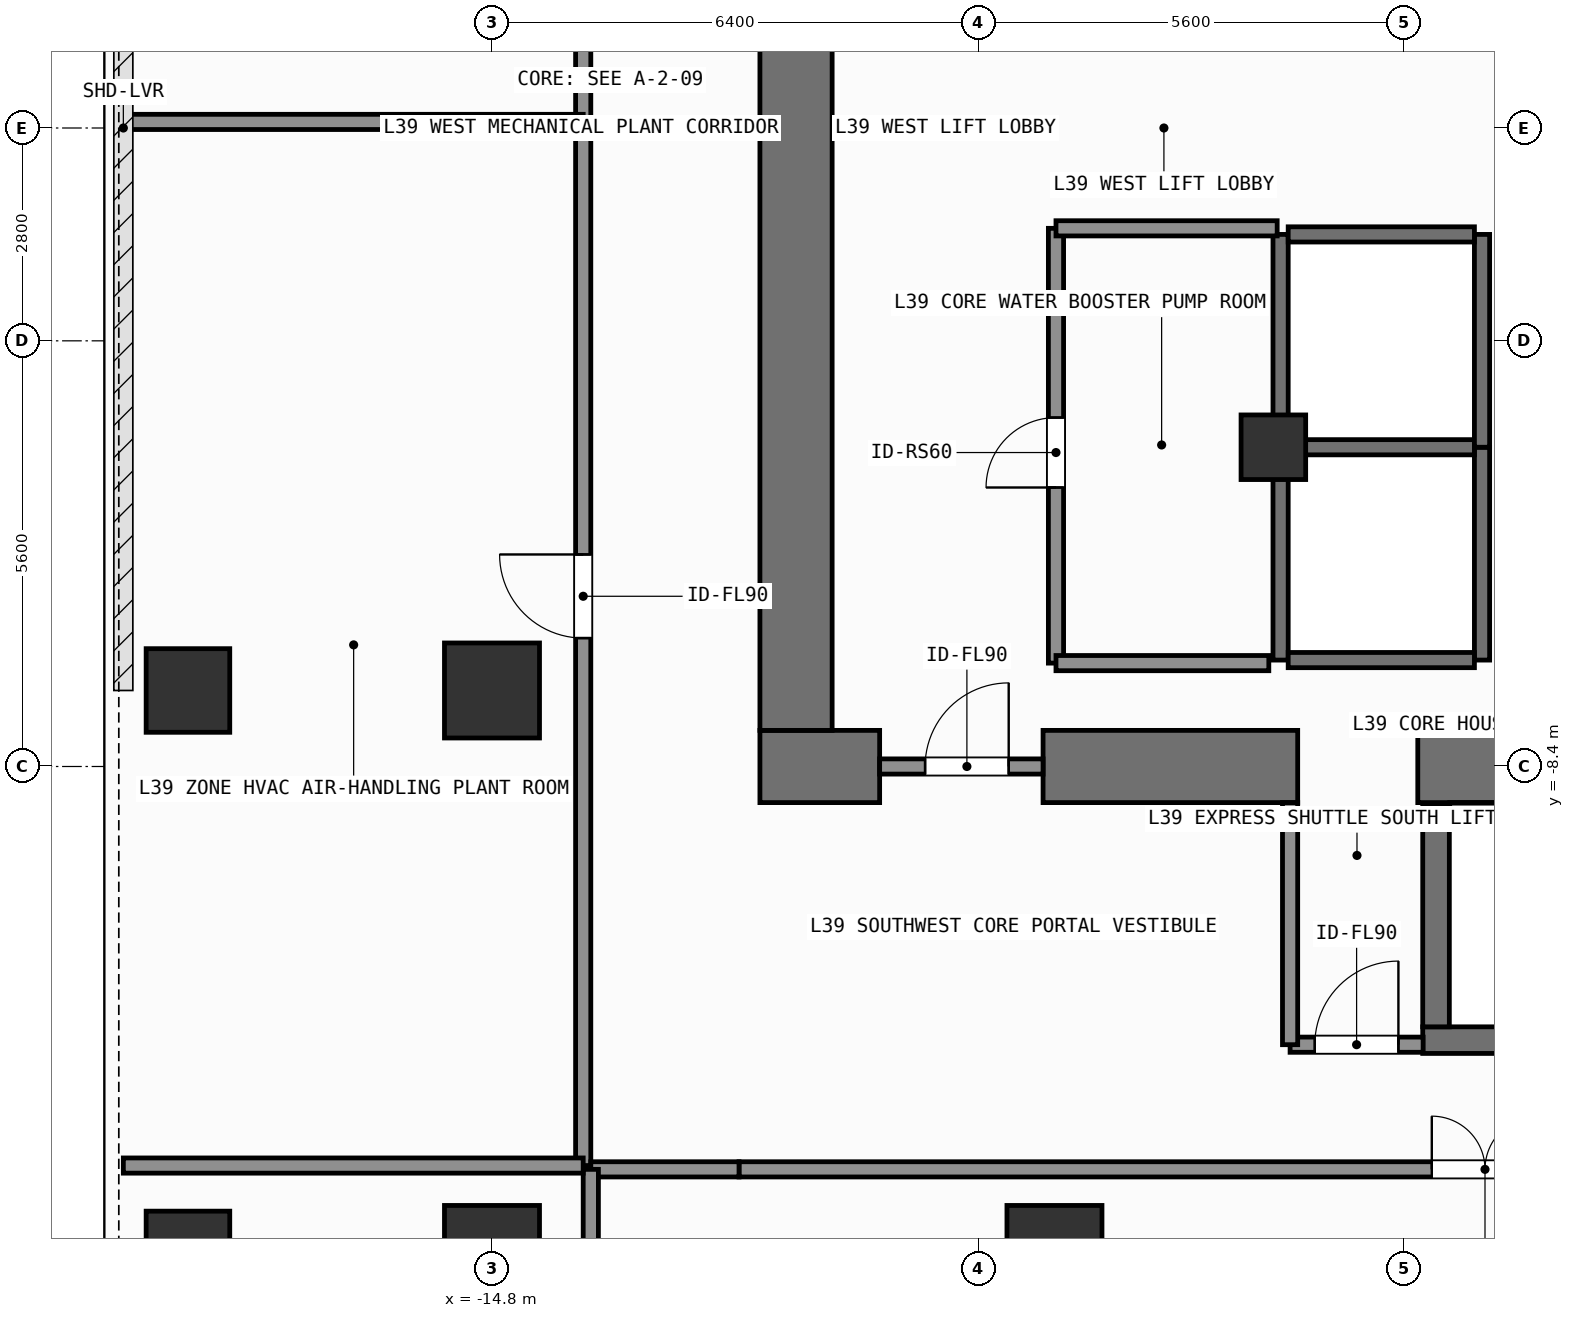
"""IFC4 building model, lengths in metres.
Left out: names, types, materials, properties, quantities, classifications, styles, units other than length and angle.
Written with IfcOpenShell. Run it as: python <this file> out.ifc"""

import sys

from ifc_helpers import new_model, si_unit, direction, frame, frame_2d, origin, origin_2d, place, context, subcontext, project, spatial, rectangle, extrude, element, fill, save


model = new_model("IFC4")
c1 = context("Model", 3, precision=1e-05, world=origin(), true_north=direction((0.0, 1.0)))
c2 = subcontext(c1, "Body", "Model", "MODEL_VIEW")
j1 = project(units=[si_unit("LENGTHUNIT", "METRE"), si_unit("PLANEANGLEUNIT", "RADIAN")], contexts=[c1])
p1 = place(None, origin())
s1 = spatial("IfcSite", under=j1, at=p1, CompositionType="ELEMENT")
p2 = place(p1, origin())
s2 = spatial("IfcBuilding", under=s1, at=p2, CompositionType="ELEMENT")
p3 = place(p2, frame((0.0, 0.0, 156.3)))
s3 = spatial("IfcBuildingStorey", under=s2, at=p3, CompositionType="ELEMENT", Elevation=156.3)
p4 = place(p3, frame((-11.275, -8.4, 0.0), z_axis=(0.0, 0.0, 1.0), x_axis=(1.0, 0.0, 0.0)))
e1 = element("IfcWall", 1, at=p4, inside=s3, PredefinedType="SHEAR", context=c2, shape_type="SweptSolid", body=[
    extrude(rectangle(XDim=1.575, YDim=0.95, at=frame_2d((0.788, 0.0))), origin(), (0.0, 0.0, 1.0), 7.8),
])
p5 = place(p3, frame((-7.55, -8.4, 0.0), z_axis=(0.0, 0.0, 1.0), x_axis=(1.0, 0.0, 0.0)))
e2 = element("IfcWall", 2, at=p5, inside=s3, PredefinedType="SHEAR", context=c2, shape_type="SweptSolid", body=[
    extrude(rectangle(XDim=3.35, YDim=0.95, at=frame_2d((1.675, 0.0))), origin(), (0.0, 0.0, 1.0), 7.8),
])
p6 = place(p3, frame((-2.62, -8.4, 0.0), z_axis=(0.0, 0.0, 1.0), x_axis=(1.0, 0.0, 0.0)))
e3 = element("IfcWall", 3, at=p6, inside=s3, PredefinedType="SHEAR", context=c2, shape_type="SweptSolid", body=[
    extrude(rectangle(XDim=7.27, YDim=0.95, at=frame_2d((3.635, 0.0))), origin(), (0.0, 0.0, 1.0), 7.8),
])
p7 = place(p3, frame((-10.8, -7.925, 0.0), z_axis=(0.0, 0.0, 1.0), x_axis=(0.0, 1.0, 0.0)))
e4 = element("IfcWall", 4, at=p7, inside=s3, PredefinedType="SHEAR", context=c2, shape_type="SweptSolid", body=[
    extrude(rectangle(XDim=15.85, YDim=0.95, at=frame_2d((7.925, 0.0))), origin(), (0.0, 0.0, 1.0), 7.8),
])
p8 = place(p3, frame((-2.555, -12.0, 0.0), z_axis=(0.0, 0.0, 1.0), x_axis=(1.0, 0.0, 0.0)))
e5 = element("IfcWall", 5, at=p8, inside=s3, PredefinedType="SHEAR", context=c2, shape_type="SweptSolid", body=[
    extrude(rectangle(XDim=7.31, YDim=0.35, at=frame_2d((3.655, 0.0))), origin(), (0.0, 0.0, 1.0), 7.8),
])
p9 = place(p3, frame((-2.2, -8.95, 0.0), z_axis=(0.0, 0.0, 1.0), x_axis=(1.0, 0.0, 0.0)))
e6 = element("IfcWall", 6, at=p9, inside=s3, PredefinedType="SHEAR", context=c2, shape_type="SweptSolid", body=[
    extrude(rectangle(XDim=6.6, YDim=0.15, at=frame_2d((3.3, 0.0))), origin(), (0.0, 0.0, 1.0), 7.8),
])
p10 = place(p3, frame((-2.38, -11.825, 0.0), z_axis=(0.0, 0.0, 1.0), x_axis=(0.0, 1.0, 0.0)))
e7 = element("IfcWall", 7, at=p10, inside=s3, PredefinedType="SHEAR", context=c2, shape_type="SweptSolid", body=[
    extrude(rectangle(XDim=2.925, YDim=0.35, at=frame_2d((1.462, 0.0))), origin(), (0.0, 0.0, 1.0), 7.8),
])
for number, where, z_axis, x_axis in (
    (8, (-14.8, -14.8, 0.0), (0.0, 0.0, 1.0), (1.0, 0.0, 0.0)),
    (9, (-7.4, -14.8, 0.0), (0.0, 0.0, 1.0), (1.0, 0.0, 0.0)),
    (10, (-14.8, -7.4, 0.0), (0.0, 0.0, 1.0), (1.0, 0.0, 0.0)),
):
    element("IfcColumn", number, at=place(p3, frame(where, z_axis=z_axis, x_axis=x_axis)), inside=s3, PredefinedType="COLUMN", context=c2, shape_type="SweptSolid", body=[
        extrude(rectangle(XDim=1.25, YDim=1.25, at=origin_2d()), origin(), (0.0, 0.0, 1.0), 7.8),
    ])
p11 = place(p3, frame((-4.52, -4.2, 0.0), z_axis=(0.0, 0.0, 1.0), x_axis=(1.0, 0.0, 0.0)))
e11 = element("IfcColumn", 11, at=p11, inside=s3, PredefinedType="COLUMN", context=c2, shape_type="SweptSolid", body=[
    extrude(rectangle(XDim=0.85, YDim=0.85, at=origin_2d()), origin(), (0.0, 0.0, 1.0), 7.8),
])
for number, where, z_axis, x_axis in (
    (12, (-18.8, -14.8, 0.0), (0.0, 0.0, 1.0), (1.0, 0.0, 0.0)),
    (13, (-18.8, -7.4, 0.0), (0.0, 0.0, 1.0), (1.0, 0.0, 0.0)),
):
    element("IfcColumn", number, at=place(p3, frame(where, z_axis=z_axis, x_axis=x_axis)), inside=s3, PredefinedType="COLUMN", context=c2, shape_type="SweptSolid", body=[
        extrude(rectangle(XDim=1.1, YDim=1.1, at=origin_2d()), origin(), (0.0, 0.0, 1.0), 7.8),
    ])
for number, where, z_axis, x_axis in (
    (14, (-4.425, -7.0, 0.0), (0.0, 0.0, 1.0), (0.0, 1.0, 0.0)),
    (15, (-1.775, -7.0, 0.0), (0.0, 0.0, 1.0), (0.0, 1.0, 0.0)),
):
    element("IfcWall", number, at=place(p3, frame(where, z_axis=z_axis, x_axis=x_axis)), inside=s3, PredefinedType="SHEAR", context=c2, shape_type="SweptSolid", body=[
        extrude(rectangle(XDim=2.8, YDim=0.2, at=frame_2d((1.4, 0.0))), origin(), (0.0, 0.0, 1.0), 7.58),
    ])
for number, where, z_axis, x_axis in (
    (16, (-4.325, -7.0, 0.0), (0.0, 0.0, 1.0), (1.0, 0.0, 0.0)),
    (17, (-4.325, -4.2, 0.0), (0.0, 0.0, 1.0), (1.0, 0.0, 0.0)),
):
    element("IfcWall", number, at=place(p3, frame(where, z_axis=z_axis, x_axis=x_axis)), inside=s3, PredefinedType="SHEAR", context=c2, shape_type="SweptSolid", body=[
        extrude(rectangle(XDim=2.45, YDim=0.2, at=frame_2d((1.225, 0.0))), origin(), (0.0, 0.0, 1.0), 7.58),
    ])
for number, where, z_axis, x_axis in (
    (18, (-4.425, -4.2, 0.0), (0.0, 0.0, 1.0), (0.0, 1.0, 0.0)),
    (19, (-1.775, -4.2, 0.0), (0.0, 0.0, 1.0), (0.0, 1.0, 0.0)),
):
    element("IfcWall", number, at=place(p3, frame(where, z_axis=z_axis, x_axis=x_axis)), inside=s3, PredefinedType="SHEAR", context=c2, shape_type="SweptSolid", body=[
        extrude(rectangle(XDim=2.8, YDim=0.2, at=frame_2d((1.4, 0.0))), origin(), (0.0, 0.0, 1.0), 7.58),
    ])
p12 = place(p3, frame((-4.325, -1.4, 0.0), z_axis=(0.0, 0.0, 1.0), x_axis=(1.0, 0.0, 0.0)))
e20 = element("IfcWall", 20, at=p12, inside=s3, PredefinedType="SHEAR", context=c2, shape_type="SweptSolid", body=[
    extrude(rectangle(XDim=2.45, YDim=0.2, at=frame_2d((1.225, 0.0))), origin(), (0.0, 0.0, 1.0), 7.58),
])
p13 = place(p3, frame((-9.7, -8.4, 0.0), z_axis=(0.0, 0.0, 1.0), x_axis=(1.0, 0.0, 0.0)))
e21 = element("IfcWall", 21, at=p13, inside=s3, PredefinedType="SOLIDWALL", context=c2, shape_type="SweptSolid", body=[
    extrude(rectangle(XDim=2.15, YDim=0.2, at=frame_2d((1.075, 0.0))), origin(), (0.0, 0.0, 1.0), 6.62),
])
p14 = place(p13, frame((0.598, 0.0, 0.0)))
e22 = element("IfcOpeningElement", 22, at=p14, cuts=e21, PredefinedType="OPENING", context=c2, shape_type="SweptSolid", body=[
    extrude(rectangle(XDim=1.1, YDim=2.15, at=frame_2d((0.55, 1.075))), frame((0.0, 0.11, 0.0), z_axis=(0.0, -1.0, 0.0), x_axis=(1.0, 0.0, 0.0)), (0.0, 0.0, 1.0), 0.22),
])
p15 = place(p3, frame((-4.3, -12.06, 0.0), z_axis=(0.0, 0.0, 1.0), x_axis=(1.0, 0.0, 0.0)))
e23 = element("IfcWall", 23, at=p15, inside=s3, PredefinedType="SOLIDWALL", context=c2, shape_type="SweptSolid", body=[
    extrude(rectangle(XDim=1.75, YDim=0.2, at=frame_2d((0.875, 0.0))), origin(), (0.0, 0.0, 1.0), 7.58),
])
p16 = place(p15, frame((0.325, 0.0, 0.0)))
e24 = element("IfcOpeningElement", 24, at=p16, cuts=e23, PredefinedType="OPENING", context=c2, shape_type="SweptSolid", body=[
    extrude(rectangle(XDim=1.1, YDim=2.15, at=frame_2d((0.55, 1.075))), frame((0.0, 0.11, 0.0), z_axis=(0.0, -1.0, 0.0), x_axis=(1.0, 0.0, 0.0)), (0.0, 0.0, 1.0), 0.22),
])
p17 = place(p3, frame((-7.38, -7.04, 0.0), z_axis=(0.0, 0.0, 1.0), x_axis=(0.0, 1.0, 0.0)))
e25 = element("IfcWall", 25, at=p17, inside=s3, PredefinedType="SOLIDWALL", context=c2, shape_type="SweptSolid", body=[
    extrude(rectangle(XDim=5.72, YDim=0.2, at=frame_2d((2.86, 0.0))), origin(), (0.0, 0.0, 1.0), 7.58),
])
p18 = place(p17, frame((2.31, 0.0, 0.0)))
e26 = element("IfcOpeningElement", 26, at=p18, cuts=e25, PredefinedType="OPENING", context=c2, shape_type="SweptSolid", body=[
    extrude(rectangle(XDim=0.92, YDim=2.1, at=frame_2d((0.46, 1.05))), frame((0.0, 0.11, 0.0), z_axis=(0.0, -1.0, 0.0), x_axis=(1.0, 0.0, 0.0)), (0.0, 0.0, 1.0), 0.22),
])
p19 = place(p3, frame((-11.55, -13.7, 0.0), z_axis=(0.0, 0.0, 1.0), x_axis=(1.0, 0.0, 0.0)))
e27 = element("IfcWall", 27, at=p19, inside=s3, PredefinedType="SOLIDWALL", context=c2, shape_type="SweptSolid", body=[
    extrude(rectangle(XDim=27.15, YDim=0.2, at=frame_2d((13.575, 0.0))), origin(), (0.0, 0.0, 1.0), 7.58),
])
p20 = place(p19, frame((9.114, 0.0, 0.0)))
e28 = element("IfcOpeningElement", 28, at=p20, cuts=e27, PredefinedType="OPENING", context=c2, shape_type="SweptSolid", body=[
    extrude(rectangle(XDim=1.4, YDim=2.2, at=frame_2d((0.7, 1.1))), frame((0.0, 0.11, 0.0), z_axis=(0.0, -1.0, 0.0), x_axis=(1.0, 0.0, 0.0)), (0.0, 0.0, 1.0), 0.22),
])
p21 = place(p3, frame((-13.6, -13.65, 0.0), z_axis=(0.0, 0.0, 1.0), x_axis=(0.0, 1.0, 0.0)))
e29 = element("IfcWall", 29, at=p21, inside=s3, PredefinedType="SOLIDWALL", context=c2, shape_type="SweptSolid", body=[
    extrude(rectangle(XDim=13.73, YDim=0.2, at=frame_2d((6.865, 0.0))), origin(), (0.0, 0.0, 1.0), 7.58),
])
p22 = place(p21, frame((6.939, 0.0, 0.0)))
e30 = element("IfcOpeningElement", 30, at=p22, cuts=e29, PredefinedType="OPENING", context=c2, shape_type="SweptSolid", body=[
    extrude(rectangle(XDim=1.1, YDim=2.15, at=frame_2d((0.55, 1.075))), frame((0.0, 0.11, 0.0), z_axis=(0.0, -1.0, 0.0), x_axis=(1.0, 0.0, 0.0)), (0.0, 0.0, 1.0), 0.22),
])
p23 = place(p3, frame((-13.6, 0.08, 0.0), z_axis=(0.0, 0.0, 1.0), x_axis=(0.0, 1.0, 0.0)))
e31 = element("IfcWall", 31, at=p23, inside=s3, PredefinedType="SOLIDWALL", context=c2, shape_type="SweptSolid", body=[
    extrude(rectangle(XDim=13.57, YDim=0.2, at=frame_2d((6.785, 0.0))), origin(), (0.0, 0.0, 1.0), 7.58),
])
p24 = place(p23, frame((5.52, 0.0, 0.0)))
e32 = element("IfcOpeningElement", 32, at=p24, cuts=e31, PredefinedType="OPENING", context=c2, shape_type="SweptSolid", body=[
    extrude(rectangle(XDim=1.1, YDim=2.15, at=frame_2d((0.55, 1.075))), frame((0.0, 0.11, 0.0), z_axis=(0.0, -1.0, 0.0), x_axis=(1.0, 0.0, 0.0)), (0.0, 0.0, 1.0), 0.22),
])
p25 = place(p3, frame((-4.3, -12.06, 0.0), z_axis=(0.0, 0.0, 1.0), x_axis=(0.0, 1.0, 0.0)))
e33 = element("IfcWall", 33, at=p25, inside=s3, PredefinedType="SOLIDWALL", context=c2, shape_type="SweptSolid", body=[
    extrude(rectangle(XDim=3.185, YDim=0.2, at=frame_2d((1.593, 0.0))), origin(), (0.0, 0.0, 1.0), 7.58),
])
p26 = place(p3, frame((-7.38, -1.32, 0.0), z_axis=(0.0, 0.0, 1.0), x_axis=(1.0, 0.0, 0.0)))
e34 = element("IfcWall", 34, at=p26, inside=s3, PredefinedType="SOLIDWALL", context=c2, shape_type="SweptSolid", body=[
    extrude(rectangle(XDim=2.91, YDim=0.2, at=frame_2d((1.455, 0.0))), origin(), (0.0, 0.0, 1.0), 7.58),
])
p27 = place(p3, frame((-7.38, -7.04, 0.0), z_axis=(0.0, 0.0, 1.0), x_axis=(1.0, 0.0, 0.0)))
e35 = element("IfcWall", 35, at=p27, inside=s3, PredefinedType="SOLIDWALL", context=c2, shape_type="SweptSolid", body=[
    extrude(rectangle(XDim=2.8, YDim=0.2, at=frame_2d((1.4, 0.0))), origin(), (0.0, 0.0, 1.0), 7.58),
])
p28 = place(p3, frame((-13.5, -13.7, 0.0), z_axis=(0.0, 0.0, 1.0), x_axis=(1.0, 0.0, 0.0)))
e36 = element("IfcWall", 36, at=p28, inside=s3, PredefinedType="SOLIDWALL", context=c2, shape_type="SweptSolid", body=[
    extrude(rectangle(XDim=1.95, YDim=0.2, at=frame_2d((0.975, 0.0))), origin(), (0.0, 0.0, 1.0), 7.58),
])
p29 = place(p3, frame((-13.5, -23.55, 0.0), z_axis=(0.0, 0.0, 1.0), x_axis=(0.0, 1.0, 0.0)))
e37 = element("IfcWall", 37, at=p29, inside=s3, PredefinedType="SOLIDWALL", context=c2, shape_type="SweptSolid", body=[
    extrude(rectangle(XDim=9.85, YDim=0.2, at=frame_2d((4.925, 0.0))), origin(), (0.0, 0.0, 1.0), 7.58),
])
for number, where, z_axis, x_axis in (
    (38, (-19.65, -13.65, 0.0), (0.0, 0.0, 1.0), (1.0, 0.0, 0.0)),
    (39, (-19.65, 0.08, 0.0), (0.0, 0.0, 1.0), (1.0, 0.0, 0.0)),
):
    element("IfcWall", number, at=place(p3, frame(where, z_axis=z_axis, x_axis=x_axis)), inside=s3, PredefinedType="SOLIDWALL", context=c2, shape_type="SweptSolid", body=[
        extrude(rectangle(XDim=6.05, YDim=0.2, at=frame_2d((3.025, 0.0))), origin(), (0.0, 0.0, 1.0), 7.58),
    ])
p30 = place(p14, origin())
e40 = element("IfcDoor", 40, at=p30, inside=s3, OperationType="SINGLE_SWING_RIGHT", PredefinedType="DOOR", context=c2, shape_type="SweptSolid", body=[
    extrude(rectangle(XDim=1.1, YDim=2.15, at=frame_2d((0.55, 1.075))), frame((0.0, 0.025, 0.0), z_axis=(0.0, -1.0, 0.0), x_axis=(1.0, 0.0, 0.0)), (0.0, 0.0, 1.0), 0.05),
])
fill(e22, e40)
p31 = place(p16, origin())
e41 = element("IfcDoor", 41, at=p31, inside=s3, OperationType="SINGLE_SWING_RIGHT", PredefinedType="DOOR", context=c2, shape_type="SweptSolid", body=[
    extrude(rectangle(XDim=1.1, YDim=2.15, at=frame_2d((0.55, 1.075))), frame((0.0, 0.025, 0.0), z_axis=(0.0, -1.0, 0.0), x_axis=(1.0, 0.0, 0.0)), (0.0, 0.0, 1.0), 0.05),
])
fill(e24, e41)
p32 = place(p18, origin())
e42 = element("IfcDoor", 42, at=p32, inside=s3, OperationType="SINGLE_SWING_LEFT", PredefinedType="DOOR", context=c2, shape_type="SweptSolid", body=[
    extrude(rectangle(XDim=0.92, YDim=2.1, at=frame_2d((0.46, 1.05))), frame((0.0, 0.025, 0.0), z_axis=(0.0, -1.0, 0.0), x_axis=(1.0, 0.0, 0.0)), (0.0, 0.0, 1.0), 0.05),
])
fill(e26, e42)
p33 = place(p20, origin())
e43 = element("IfcDoor", 43, at=p33, inside=s3, OperationType="SINGLE_SWING_LEFT", PredefinedType="DOOR", context=c2, shape_type="SweptSolid", body=[
    extrude(rectangle(XDim=1.4, YDim=2.2, at=frame_2d((0.7, 1.1))), frame((0.0, 0.025, 0.0), z_axis=(0.0, -1.0, 0.0), x_axis=(1.0, 0.0, 0.0)), (0.0, 0.0, 1.0), 0.05),
])
fill(e28, e43)
p34 = place(p22, origin())
e44 = element("IfcDoor", 44, at=p34, inside=s3, OperationType="SINGLE_SWING_RIGHT", PredefinedType="DOOR", context=c2, shape_type="SweptSolid", body=[
    extrude(rectangle(XDim=1.1, YDim=2.15, at=frame_2d((0.55, 1.075))), frame((0.0, 0.025, 0.0), z_axis=(0.0, -1.0, 0.0), x_axis=(1.0, 0.0, 0.0)), (0.0, 0.0, 1.0), 0.05),
])
fill(e30, e44)
save(model, sys.argv[1])
